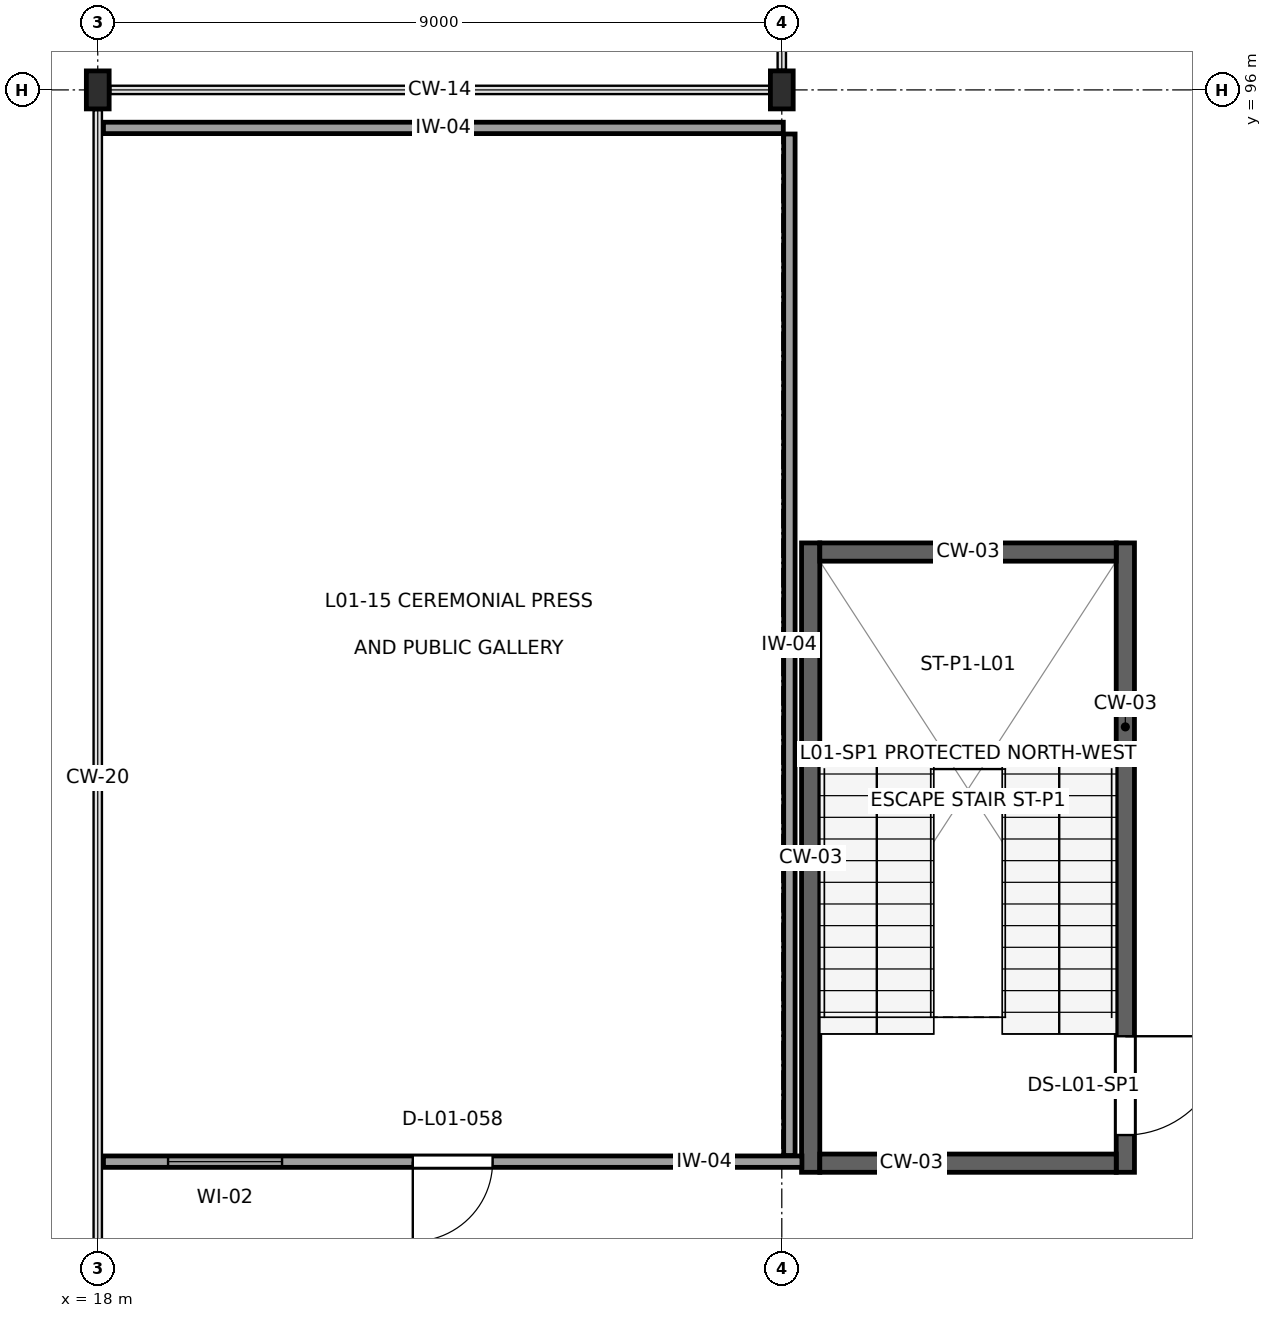
"""IFC4 building model, lengths in metres.
Left out: names, types, materials, properties, quantities, classifications, styles, units other than length and angle.
Written with IfcOpenShell. Run it as: python <this file> out.ifc"""

import sys

from ifc_helpers import new_model, si_unit, direction, frame, frame_2d, origin, origin_2d, place, context, subcontext, project, spatial, rectangle, i_section, extrude, element, fill, save


model = new_model("IFC4")
c1 = context("Model", 3, precision=1e-05, world=origin(), true_north=direction((0.0, 1.0)))
c2 = subcontext(c1, "Body", "Model", "MODEL_VIEW")
j1 = project(units=[si_unit("LENGTHUNIT", "METRE"), si_unit("PLANEANGLEUNIT", "RADIAN")], contexts=[c1])
p1 = place(None, origin())
s1 = spatial("IfcSite", under=j1, at=p1, CompositionType="ELEMENT")
p2 = place(p1, origin())
s2 = spatial("IfcBuilding", under=s1, at=p2, CompositionType="ELEMENT")
p3 = place(p2, frame((0.0, 0.0, 5.4)))
s3 = spatial("IfcBuildingStorey", under=s2, at=p3, CompositionType="ELEMENT", Elevation=5.4)
for number, where, z_axis, x_axis in (
    (1, (18.0, 96.0, 0.0), (0.0, 0.0, 1.0), (1.0, 0.0, 0.0)),
    (2, (27.0, 96.0, 0.0), (0.0, 0.0, 1.0), (1.0, 0.0, 0.0)),
):
    element("IfcColumn", number, at=place(p3, frame(where, z_axis=z_axis, x_axis=x_axis)), inside=s3, PredefinedType="COLUMN", context=c2, shape_type="SweptSolid", body=[
        extrude(i_section(OverallWidth=0.3, OverallDepth=0.5, WebThickness=0.014, FlangeThickness=0.028, at=origin_2d()), origin(), (0.0, 0.0, 1.0), 4.5),
    ])
p4 = place(p3, frame((27.38, 81.76, 0.0), z_axis=(0.0, 0.0, 1.0), x_axis=(0.0, 1.0, 0.0)))
e3 = element("IfcWall", 3, at=p4, inside=s3, PredefinedType="SHEAR", context=c2, shape_type="SweptSolid", body=[
    extrude(rectangle(XDim=8.28, YDim=0.24, at=frame_2d((4.14, 0.0))), origin(), (0.0, 0.0, 1.0), 4.31),
])
p5 = place(p3, frame((31.52, 81.76, 0.0), z_axis=(0.0, 0.0, 1.0), x_axis=(0.0, 1.0, 0.0)))
e4 = element("IfcWall", 4, at=p5, inside=s3, PredefinedType="SHEAR", context=c2, shape_type="SweptSolid", body=[
    extrude(rectangle(XDim=8.28, YDim=0.24, at=frame_2d((4.14, 0.0))), origin(), (0.0, 0.0, 1.0), 4.31),
])
p6 = place(p5, frame((0.49, 0.0, 0.0)))
e5 = element("IfcOpeningElement", 5, at=p6, cuts=e4, PredefinedType="OPENING", context=c2, shape_type="SweptSolid", body=[
    extrude(rectangle(XDim=1.3, YDim=2.2, at=frame_2d((0.65, 1.1))), frame((0.0, 0.135, 0.0), z_axis=(0.0, -1.0, 0.0), x_axis=(1.0, 0.0, 0.0)), (0.0, 0.0, 1.0), 0.27),
])
for number, where, z_axis, x_axis in (
    (6, (27.5, 81.88, 0.0), (0.0, 0.0, 1.0), (1.0, 0.0, 0.0)),
    (7, (27.5, 89.92, 0.0), (0.0, 0.0, 1.0), (1.0, 0.0, 0.0)),
):
    element("IfcWall", number, at=place(p3, frame(where, z_axis=z_axis, x_axis=x_axis)), inside=s3, PredefinedType="SHEAR", context=c2, shape_type="SweptSolid", body=[
        extrude(rectangle(XDim=3.9, YDim=0.24, at=frame_2d((1.95, 0.0))), origin(), (0.0, 0.0, 1.0), 4.31),
    ])
p7 = place(p3, frame((18.075, 95.5, 0.0), z_axis=(0.0, 0.0, 1.0), x_axis=(1.0, 0.0, 0.0)))
e8 = element("IfcWall", 8, at=p7, inside=s3, PredefinedType="PARTITIONING", context=c2, shape_type="SweptSolid", body=[
    extrude(rectangle(XDim=8.945, YDim=0.15, at=frame_2d((4.473, 0.0))), origin(), (0.0, 0.0, 1.0), 4.14),
])
p8 = place(p3, frame((27.1, 95.42, 0.0), z_axis=(0.0, 0.0, 1.0), x_axis=(0.0, -1.0, 0.0)))
e9 = element("IfcWall", 9, at=p8, inside=s3, PredefinedType="PARTITIONING", context=c2, shape_type="SweptSolid", body=[
    extrude(rectangle(XDim=13.44, YDim=0.15, at=frame_2d((6.72, 0.0))), origin(), (0.0, 0.0, 1.0), 3.525),
])
p9 = place(p3, frame((27.265, 81.9, 0.0), z_axis=(0.0, 0.0, 1.0), x_axis=(-1.0, 0.0, 0.0)))
e10 = element("IfcWall", 10, at=p9, inside=s3, PredefinedType="PARTITIONING", context=c2, shape_type="SweptSolid", body=[
    extrude(rectangle(XDim=9.19, YDim=0.15, at=frame_2d((4.595, 0.0))), origin(), (0.0, 0.0, 1.0), 4.14),
])
p10 = place(p9, frame((4.07, 0.0, 0.0)))
e11 = element("IfcOpeningElement", 11, at=p10, cuts=e10, PredefinedType="OPENING", context=c2, shape_type="SweptSolid", body=[
    extrude(rectangle(XDim=1.05, YDim=2.25, at=frame_2d((0.525, 1.125))), frame((0.0, 0.09, 0.0), z_axis=(0.0, -1.0, 0.0), x_axis=(1.0, 0.0, 0.0)), (0.0, 0.0, 1.0), 0.18),
])
p11 = place(p9, frame((6.84, 0.0, 1.05)))
e12 = element("IfcOpeningElement", 12, at=p11, cuts=e10, PredefinedType="OPENING", context=c2, shape_type="SweptSolid", body=[
    extrude(rectangle(XDim=1.5, YDim=1.1, at=frame_2d((0.75, 0.55))), frame((0.0, 0.09, 0.0), z_axis=(0.0, -1.0, 0.0), x_axis=(1.0, 0.0, 0.0)), (0.0, 0.0, 1.0), 0.18),
])
p12 = place(p6, frame((1.3, 0.0, 0.0), z_axis=(0.0, 0.0, 1.0), x_axis=(-1.0, 0.0, 0.0)))
e13 = element("IfcDoor", 13, at=p12, inside=s3, OperationType="SINGLE_SWING_RIGHT", PredefinedType="DOOR", context=c2, shape_type="SweptSolid", body=[
    extrude(rectangle(XDim=1.3, YDim=2.2, at=frame_2d((0.65, 1.1))), frame((0.0, 0.025, 0.0), z_axis=(0.0, -1.0, 0.0), x_axis=(1.0, 0.0, 0.0)), (0.0, 0.0, 1.0), 0.05),
])
fill(e5, e13)
p13 = place(p10, origin())
e14 = element("IfcDoor", 14, at=p13, inside=s3, OperationType="SINGLE_SWING_RIGHT", PredefinedType="DOOR", context=c2, shape_type="SweptSolid", body=[
    extrude(rectangle(XDim=1.05, YDim=2.25, at=frame_2d((0.525, 1.125))), frame((0.0, 0.025, 0.0), z_axis=(0.0, -1.0, 0.0), x_axis=(1.0, 0.0, 0.0)), (0.0, 0.0, 1.0), 0.05),
])
fill(e11, e14)
p14 = place(p11, origin())
e15 = element("IfcWindow", 15, at=p14, inside=s3, PartitioningType="SINGLE_PANEL", PredefinedType="WINDOW", context=c2, shape_type="SweptSolid", body=[
    extrude(rectangle(XDim=1.5, YDim=1.1, at=frame_2d((0.75, 0.55))), frame((0.0, 0.03, 0.0), z_axis=(0.0, -1.0, 0.0), x_axis=(1.0, 0.0, 0.0)), (0.0, 0.0, 1.0), 0.06),
])
fill(e12, e15)
save(model, sys.argv[1])
